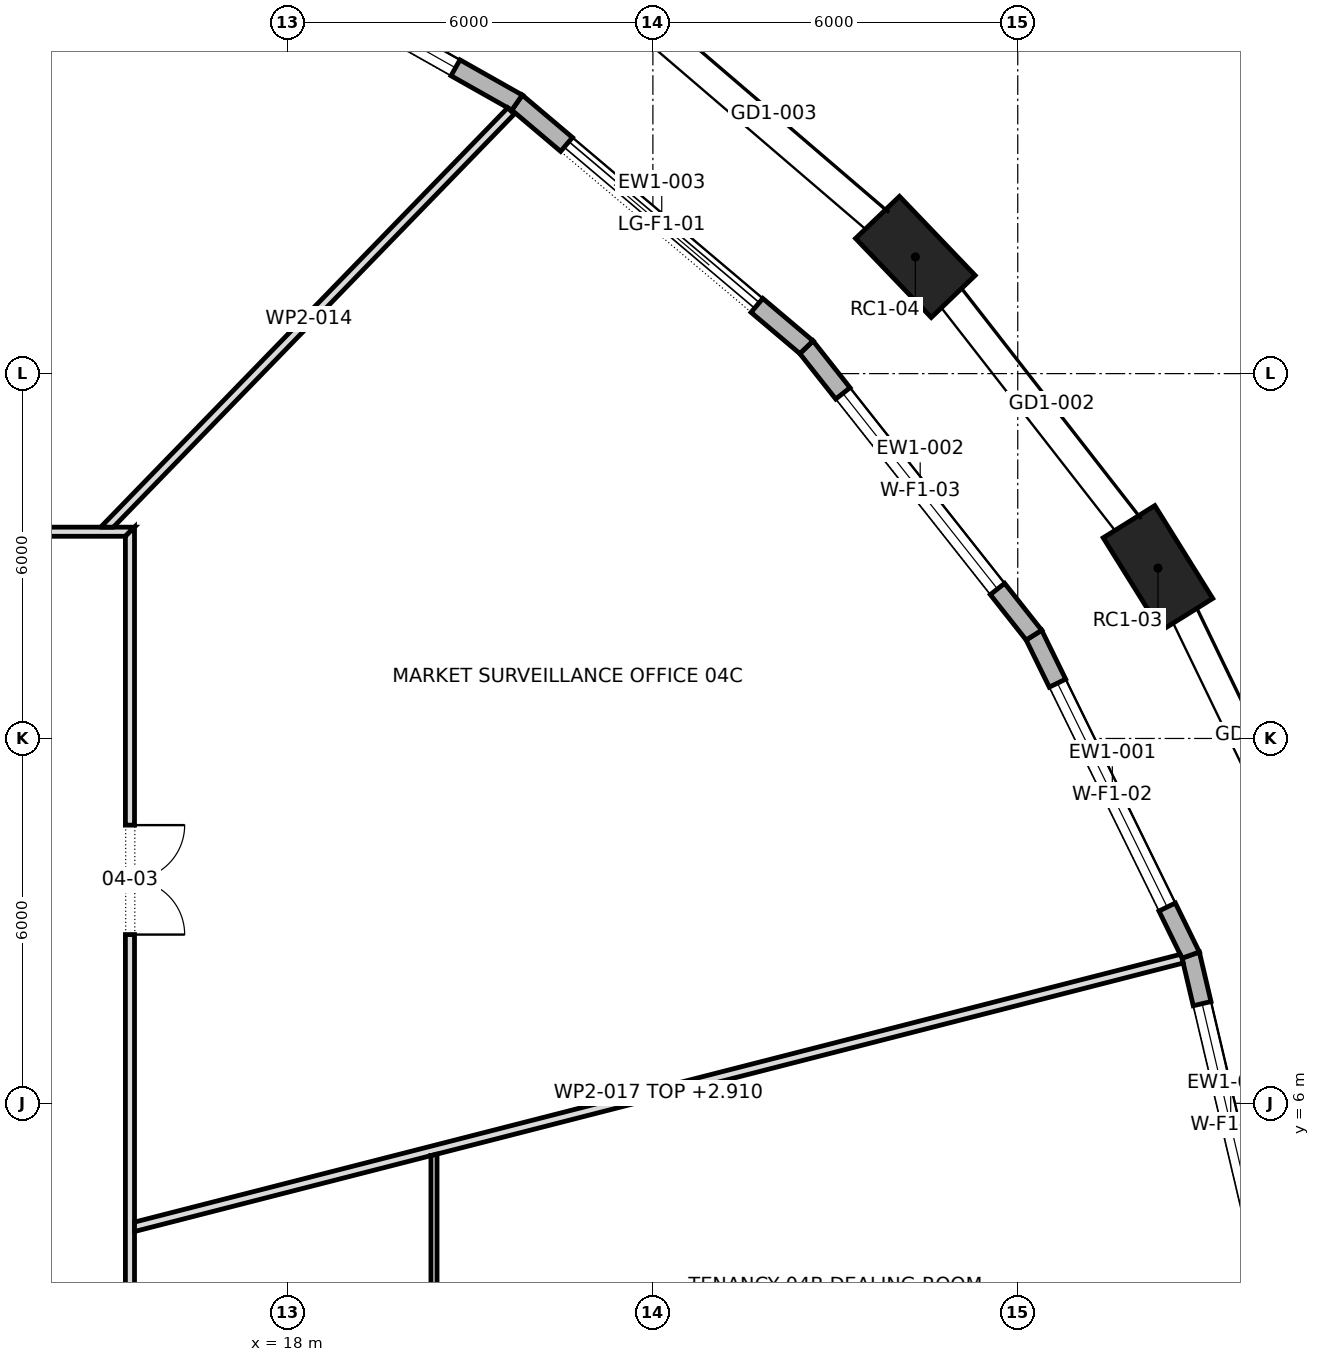
"""IFC4 building model, lengths in metres.
Left out: names, types, materials, properties, quantities, classifications, styles, units other than length and angle.
Written with IfcOpenShell. Run it as: python <this file> out.ifc"""

import sys

from ifc_helpers import new_model, si_unit, direction, frame, frame_2d, origin, origin_2d, place, context, subcontext, project, spatial, polyline, rectangle, outline, extrude, element, fill, save


model = new_model("IFC4")
c1 = context("Model", 3, precision=1e-05, world=origin(), true_north=direction((0.0, 1.0)))
c2 = subcontext(c1, "Body", "Model", "MODEL_VIEW")
j1 = project(units=[si_unit("LENGTHUNIT", "METRE"), si_unit("PLANEANGLEUNIT", "RADIAN")], contexts=[c1])
p1 = place(None, origin())
s1 = spatial("IfcSite", under=j1, at=p1, CompositionType="ELEMENT")
p2 = place(p1, origin())
s2 = spatial("IfcBuilding", under=s1, at=p2, CompositionType="ELEMENT")
p3 = place(p2, frame((0.0, 0.0, 69.7)))
s3 = spatial("IfcBuildingStorey", under=s2, at=p3, CompositionType="ELEMENT", Elevation=69.7)
for number, where, z_axis, x_axis in (
    (1, (32.306, 14.801, 0.0), (0.0, 0.0, 1.0), (-0.529, 0.849, 0.0)),
    (2, (28.317, 19.919, 0.0), (0.0, 0.0, 1.0), (-0.692, 0.722, 0.0)),
):
    element("IfcColumn", number, at=place(p3, frame(where, z_axis=z_axis, x_axis=x_axis)), inside=s3, PredefinedType="COLUMN", context=c2, shape_type="SweptSolid", body=[
        extrude(rectangle(XDim=1.8, YDim=1.0, at=origin_2d()), origin(), (0.0, 0.0, 1.0), 4.2),
    ])
p4 = place(p3, frame((34.159, 2.849, 0.0), z_axis=(0.0, 0.0, 1.0), x_axis=(-0.22905355604, 0.973413821797, 0.0)))
e3 = element("IfcWall", 3, at=p4, inside=s3, PredefinedType="STANDARD", context=c2, shape_type="SweptSolid", body=[
    extrude(outline(polyline([(-0.017, -0.15), (5.758, -0.15), (5.724, 0.15), (0.017, 0.15), (-0.017, -0.15)])), origin(), (0.0, 0.0, 1.0), 3.9),
])
p5 = place(p4, frame((0.82, 0.0, 0.6)))
e4 = element("IfcOpeningElement", 4, at=p5, cuts=e3, PredefinedType="OPENING", context=c2, shape_type="SweptSolid", body=[
    extrude(rectangle(XDim=4.1, YDim=2.85, at=frame_2d((2.05, 1.425))), frame((0.0, 0.162, 0.0), z_axis=(0.0, -1.0, 0.0), x_axis=(1.0, 0.0, 0.0)), (0.0, 0.0, 1.0), 0.324),
])
p6 = place(p3, frame((32.844, 8.438, 0.0), z_axis=(0.0, 0.0, 1.0), x_axis=(-0.439949735177, 0.898022399786, 0.0)))
e5 = element("IfcWall", 5, at=p6, inside=s3, PredefinedType="STANDARD", context=c2, shape_type="SweptSolid", body=[
    extrude(outline(polyline([(-0.017, -0.15), (5.876, -0.15), (5.844, 0.15), (0.017, 0.15), (-0.017, -0.15)])), origin(), (0.0, 0.0, 1.0), 3.9),
])
p7 = place(p6, frame((0.88, 0.0, 0.6)))
e6 = element("IfcOpeningElement", 6, at=p7, cuts=e5, PredefinedType="OPENING", context=c2, shape_type="SweptSolid", body=[
    extrude(rectangle(XDim=4.1, YDim=2.85, at=frame_2d((2.05, 1.425))), frame((0.0, 0.162, 0.0), z_axis=(0.0, -1.0, 0.0), x_axis=(1.0, 0.0, 0.0)), (0.0, 0.0, 1.0), 0.324),
])
p8 = place(p3, frame((30.266, 13.7, 0.0), z_axis=(0.0, 0.0, 1.0), x_axis=(-0.620065339223, 0.784550173727, 0.0)))
e7 = element("IfcWall", 7, at=p8, inside=s3, PredefinedType="STANDARD", context=c2, shape_type="SweptSolid", body=[
    extrude(outline(polyline([(-0.016, -0.15), (6.049, -0.15), (6.019, 0.15), (0.016, 0.15), (-0.016, -0.15)])), origin(), (0.0, 0.0, 1.0), 3.9),
])
p9 = place(p8, frame((0.967, 0.0, 0.6)))
e8 = element("IfcOpeningElement", 8, at=p9, cuts=e7, PredefinedType="OPENING", context=c2, shape_type="SweptSolid", body=[
    extrude(rectangle(XDim=4.1, YDim=2.85, at=frame_2d((2.05, 1.425))), frame((0.0, 0.162, 0.0), z_axis=(0.0, -1.0, 0.0), x_axis=(1.0, 0.0, 0.0)), (0.0, 0.0, 1.0), 0.324),
])
p10 = place(p3, frame((26.525, 18.434, 0.0), z_axis=(0.0, 0.0, 1.0), x_axis=(-0.763655167989, 0.645624336905, 0.0)))
e9 = element("IfcWall", 9, at=p10, inside=s3, PredefinedType="STANDARD", context=c2, shape_type="SweptSolid", body=[
    extrude(outline(polyline([(-0.015, -0.15), (6.246, -0.15), (6.218, 0.15), (0.015, 0.15), (-0.015, -0.15)])), origin(), (0.0, 0.0, 1.0), 3.9),
])
p11 = place(p10, frame((1.066, 0.0, 0.0)))
e10 = element("IfcOpeningElement", 10, at=p11, cuts=e9, PredefinedType="OPENING", context=c2, shape_type="SweptSolid", body=[
    extrude(rectangle(XDim=4.1, YDim=3.45, at=frame_2d((2.05, 1.725))), frame((0.0, 0.162, 0.0), z_axis=(0.0, -1.0, 0.0), x_axis=(1.0, 0.0, 0.0)), (0.0, 0.0, 1.0), 0.324),
])
p12 = place(p3, frame((21.766, 22.457, 0.0), z_axis=(0.0, 0.0, 1.0), x_axis=(-0.870673928577, 0.491860661262, 0.0)))
e11 = element("IfcWall", 11, at=p12, inside=s3, PredefinedType="STANDARD", context=c2, shape_type="SweptSolid", body=[
    extrude(outline(polyline([(-0.014, -0.15), (6.438, -0.15), (6.411, 0.15), (0.014, 0.15), (-0.014, -0.15)])), origin(), (0.0, 0.0, 1.0), 3.9),
])
p13 = place(p12, frame((1.163, 0.0, 0.6)))
e12 = element("IfcOpeningElement", 12, at=p13, cuts=e11, PredefinedType="OPENING", context=c2, shape_type="SweptSolid", body=[
    extrude(rectangle(XDim=4.1, YDim=2.85, at=frame_2d((2.05, 1.425))), frame((0.0, 0.162, 0.0), z_axis=(0.0, -1.0, 0.0), x_axis=(1.0, 0.0, 0.0)), (0.0, 0.0, 1.0), 0.324),
])
p14 = place(p3, frame((-15.475, 15.4, 0.0), z_axis=(0.0, 0.0, 1.0), x_axis=(1.0, 0.0, 0.0)))
e13 = element("IfcWall", 13, at=p14, inside=s3, PredefinedType="PARTITIONING", context=c2, shape_type="SweptSolid", body=[
    extrude(outline(polyline([(0.15, -0.075), (2.066, -0.075), (3.981, -0.075), (5.897, -0.075), (7.812, -0.075), (9.728, -0.075), (11.644, -0.075), (13.56, -0.075), (15.475, -0.075), (17.391, -0.075), (19.306, -0.075), (21.222, -0.075), (23.138, -0.075), (25.053, -0.075), (26.969, -0.075), (28.885, -0.075), (30.8, -0.075), (30.95, 0.075), (29.016, 0.075), (27.081, 0.075), (25.147, 0.075), (23.212, 0.075), (21.278, 0.075), (19.344, 0.075), (17.409, 0.075), (15.475, 0.075), (13.541, 0.075), (11.606, 0.075), (9.672, 0.075), (7.738, 0.075), (5.803, 0.075), (3.869, 0.075), (1.935, 0.075), (0.0, 0.075), (0.15, -0.075)])), origin(), (0.0, 0.0, 1.0), 3.9),
])
p15 = place(p14, frame((22.945, 0.0, 0.0)))
e14 = element("IfcOpeningElement", 14, at=p15, cuts=e13, PredefinedType="OPENING", context=c2, shape_type="SweptSolid", body=[
    extrude(rectangle(XDim=1.8, YDim=2.1, at=frame_2d((0.9, 1.05))), frame((0.0, 0.087, 0.0), z_axis=(0.0, -1.0, 0.0), x_axis=(1.0, 0.0, 0.0)), (0.0, 0.0, 1.0), 0.174),
])
p16 = place(p14, frame((11.0, 0.0, 0.0)))
e15 = element("IfcOpeningElement", 15, at=p16, cuts=e13, PredefinedType="OPENING", context=c2, shape_type="SweptSolid", body=[
    extrude(rectangle(XDim=1.0, YDim=2.1, at=frame_2d((0.5, 1.05))), frame((0.0, 0.087, 0.0), z_axis=(0.0, -1.0, 0.0), x_axis=(1.0, 0.0, 0.0)), (0.0, 0.0, 1.0), 0.174),
])
p17 = place(p3, frame((14.972, 15.423, 0.0), z_axis=(0.0, 0.0, 1.0), x_axis=(0.696498460967, 0.717558286044, 0.0)))
e16 = element("IfcWall", 16, at=p17, inside=s3, PredefinedType="PARTITIONING", context=c2, shape_type="SweptSolid", body=[
    extrude(outline(polyline([(0.0, 0.075), (0.0, 0.074), (0.145, -0.075), (2.038, -0.075), (3.931, -0.075), (5.824, -0.075), (7.717, -0.075), (9.61, -0.075), (9.61, 0.075), (7.688, 0.075), (5.766, 0.075), (3.844, 0.075), (1.922, 0.075), (0.0, 0.075)])), origin(), (0.0, 0.0, 1.0), 3.9),
])
p18 = place(p3, frame((15.4, -15.475, 0.0), z_axis=(0.0, 0.0, 1.0), x_axis=(0.0, 1.0, 0.0)))
e17 = element("IfcWall", 17, at=p18, inside=s3, PredefinedType="PARTITIONING", context=c2, shape_type="SweptSolid", body=[
    extrude(outline(polyline([(0.0, -0.075), (1.935, -0.075), (3.869, -0.075), (5.803, -0.075), (7.738, -0.075), (9.672, -0.075), (11.606, -0.075), (13.541, -0.075), (15.475, -0.075), (17.409, -0.075), (19.344, -0.075), (21.278, -0.075), (23.212, -0.075), (25.147, -0.075), (27.081, -0.075), (29.016, -0.075), (30.95, -0.075), (30.8, 0.075), (28.885, 0.075), (26.969, 0.075), (25.053, 0.075), (23.138, 0.075), (21.222, 0.075), (19.306, 0.075), (17.391, 0.075), (15.475, 0.075), (13.56, 0.075), (11.644, 0.075), (9.728, 0.075), (7.812, 0.075), (5.897, 0.075), (3.981, 0.075), (2.066, 0.075), (0.15, 0.075), (0.0, -0.075)])), origin(), (0.0, 0.0, 1.0), 3.9),
])
p19 = place(p18, frame((4.9, 0.0, 0.0)))
e18 = element("IfcOpeningElement", 18, at=p19, cuts=e17, PredefinedType="OPENING", context=c2, shape_type="SweptSolid", body=[
    extrude(rectangle(XDim=1.8, YDim=2.1, at=frame_2d((0.9, 1.05))), frame((0.0, 0.087, 0.0), z_axis=(0.0, -1.0, 0.0), x_axis=(1.0, 0.0, 0.0)), (0.0, 0.0, 1.0), 0.174),
])
p20 = place(p18, frame((14.975, 0.0, 0.0)))
e19 = element("IfcOpeningElement", 19, at=p20, cuts=e17, PredefinedType="OPENING", context=c2, shape_type="SweptSolid", body=[
    extrude(rectangle(XDim=1.0, YDim=2.1, at=frame_2d((0.5, 1.05))), frame((0.0, 0.087, 0.0), z_axis=(0.0, -1.0, 0.0), x_axis=(1.0, 0.0, 0.0)), (0.0, 0.0, 1.0), 0.174),
])
p21 = place(p18, frame((24.25, 0.0, 0.0)))
e20 = element("IfcOpeningElement", 20, at=p21, cuts=e17, PredefinedType="OPENING", context=c2, shape_type="SweptSolid", body=[
    extrude(rectangle(XDim=1.8, YDim=2.1, at=frame_2d((0.9, 1.05))), frame((0.0, 0.087, 0.0), z_axis=(0.0, -1.0, 0.0), x_axis=(1.0, 0.0, 0.0)), (0.0, 0.0, 1.0), 0.174),
])
p22 = place(p3, frame((15.457, 3.965, 0.0), z_axis=(0.0, 0.0, 1.0), x_axis=(0.968758808885, 0.248004778598, 0.0)))
e21 = element("IfcWall", 21, at=p22, inside=s3, PredefinedType="PARTITIONING", context=c2, shape_type="SweptSolid", body=[
    extrude(outline(polyline([(0.0, -0.075), (1.677, -0.075), (3.354, -0.075), (5.032, -0.075), (5.032, -0.075), (5.032, -0.075), (6.856, -0.075), (8.68, -0.075), (10.505, -0.075), (12.329, -0.075), (14.153, -0.075), (15.977, -0.075), (17.801, -0.075), (17.801, 0.017), (17.789, 0.075), (15.817, 0.075), (13.844, 0.075), (11.872, 0.075), (9.9, 0.075), (7.927, 0.075), (5.955, 0.075), (3.983, 0.075), (2.01, 0.075), (0.038, 0.075), (0.0, -0.073), (0.0, -0.075)])), origin(), (0.0, 0.0, 1.0), 2.91),
])
p23 = place(p3, frame((20.4, 5.165, 0.0), z_axis=(0.0, 0.0, 1.0), x_axis=(0.0, -1.0, 0.0)))
e22 = element("IfcWall", 22, at=p23, inside=s3, PredefinedType="PARTITIONING", context=c2, shape_type="SweptSolid", body=[
    extrude(outline(polyline([(0.025, -0.05), (1.739, -0.05), (3.452, -0.05), (5.166, -0.05), (6.879, -0.05), (8.593, -0.05), (10.306, -0.05), (10.332, 0.05), (10.332, 0.05), (8.61, 0.05), (6.888, 0.05), (5.166, 0.05), (3.444, 0.05), (1.722, 0.05), (0.0, 0.05), (0.0, 0.049), (0.025, -0.05)])), origin(), (0.0, 0.0, 1.0), 3.9),
])
p24 = place(p23, frame((4.715, 0.0, 0.0)))
e23 = element("IfcOpeningElement", 23, at=p24, cuts=e22, PredefinedType="OPENING", context=c2, shape_type="SweptSolid", body=[
    extrude(rectangle(XDim=0.9, YDim=2.1, at=frame_2d((0.45, 1.05))), frame((0.0, 0.062, 0.0), z_axis=(0.0, -1.0, 0.0), x_axis=(1.0, 0.0, 0.0)), (0.0, 0.0, 1.0), 0.124),
])
p25 = place(p5, origin())
e24 = element("IfcWindow", 24, at=p25, inside=s3, PartitioningType="TRIPLE_PANEL_VERTICAL", PredefinedType="WINDOW", context=c2, shape_type="SweptSolid", body=[
    extrude(rectangle(XDim=4.1, YDim=2.85, at=frame_2d((2.05, 1.425))), frame((0.0, 0.03, 0.0), z_axis=(0.0, -1.0, 0.0), x_axis=(1.0, 0.0, 0.0)), (0.0, 0.0, 1.0), 0.06),
])
fill(e4, e24)
p26 = place(p7, origin())
e25 = element("IfcWindow", 25, at=p26, inside=s3, PartitioningType="TRIPLE_PANEL_VERTICAL", PredefinedType="WINDOW", context=c2, shape_type="SweptSolid", body=[
    extrude(rectangle(XDim=4.1, YDim=2.85, at=frame_2d((2.05, 1.425))), frame((0.0, 0.03, 0.0), z_axis=(0.0, -1.0, 0.0), x_axis=(1.0, 0.0, 0.0)), (0.0, 0.0, 1.0), 0.06),
])
fill(e6, e25)
p27 = place(p9, origin())
e26 = element("IfcWindow", 26, at=p27, inside=s3, PartitioningType="TRIPLE_PANEL_VERTICAL", PredefinedType="WINDOW", context=c2, shape_type="SweptSolid", body=[
    extrude(rectangle(XDim=4.1, YDim=2.85, at=frame_2d((2.05, 1.425))), frame((0.0, 0.03, 0.0), z_axis=(0.0, -1.0, 0.0), x_axis=(1.0, 0.0, 0.0)), (0.0, 0.0, 1.0), 0.06),
])
fill(e8, e26)
p28 = place(p11, origin())
e27 = element("IfcDoor", 27, at=p28, inside=s3, OperationType="DOUBLE_DOOR_SLIDING", PredefinedType="DOOR", context=c2, shape_type="SweptSolid", body=[
    extrude(rectangle(XDim=4.1, YDim=3.45, at=frame_2d((2.05, 1.725))), frame((0.0, 0.025, 0.0), z_axis=(0.0, -1.0, 0.0), x_axis=(1.0, 0.0, 0.0)), (0.0, 0.0, 1.0), 0.05),
])
fill(e10, e27)
p29 = place(p13, origin())
e28 = element("IfcWindow", 28, at=p29, inside=s3, PartitioningType="TRIPLE_PANEL_VERTICAL", PredefinedType="WINDOW", context=c2, shape_type="SweptSolid", body=[
    extrude(rectangle(XDim=4.1, YDim=2.85, at=frame_2d((2.05, 1.425))), frame((0.0, 0.03, 0.0), z_axis=(0.0, -1.0, 0.0), x_axis=(1.0, 0.0, 0.0)), (0.0, 0.0, 1.0), 0.06),
])
fill(e12, e28)
p30 = place(p21, frame((1.8, 0.0, 0.0), z_axis=(0.0, 0.0, 1.0), x_axis=(-1.0, 0.0, 0.0)))
e29 = element("IfcDoor", 29, at=p30, inside=s3, OperationType="DOUBLE_DOOR_SINGLE_SWING", PredefinedType="DOOR", context=c2, shape_type="SweptSolid", body=[
    extrude(rectangle(XDim=1.8, YDim=2.1, at=frame_2d((0.9, 1.05))), frame((0.0, 0.025, 0.0), z_axis=(0.0, -1.0, 0.0), x_axis=(1.0, 0.0, 0.0)), (0.0, 0.0, 1.0), 0.05),
])
fill(e20, e29)
save(model, sys.argv[1])
